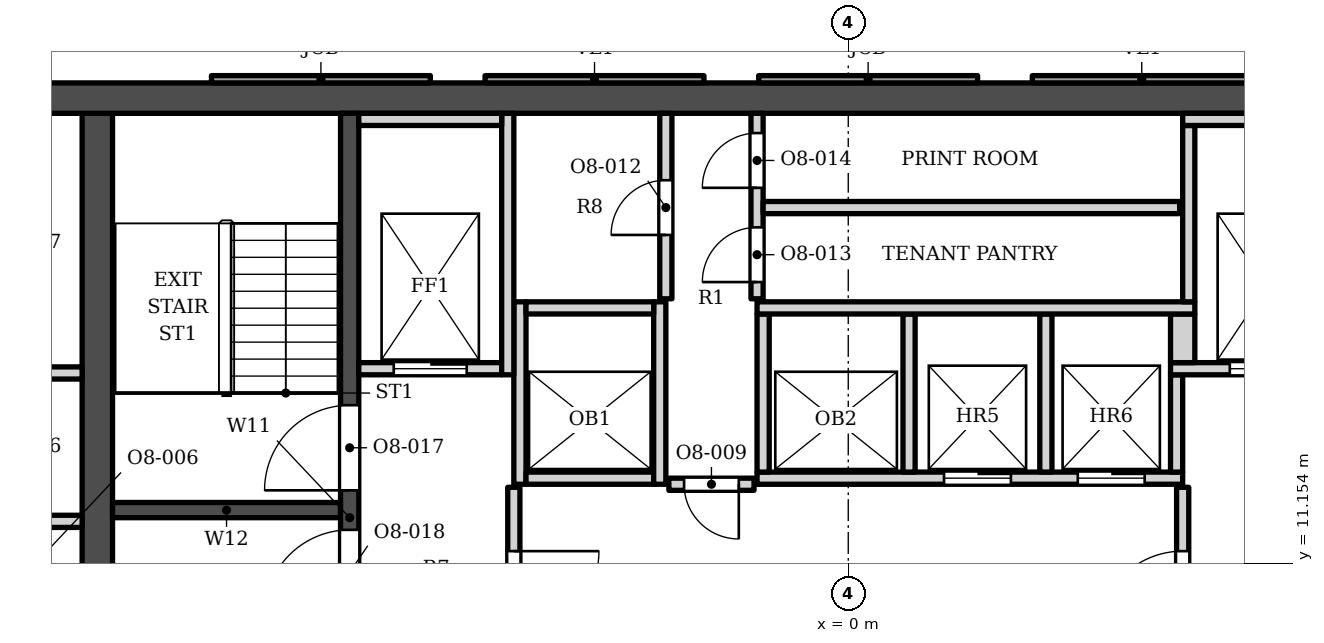
"""IFC4 building model, lengths in metres.
Left out: names, types, materials, properties, quantities, classifications, styles, units other than length and angle.
Written with IfcOpenShell. Run it as: python <this file> out.ifc"""

import sys

from ifc_helpers import new_model, si_unit, direction, frame, frame_2d, origin, place, context, subcontext, project, spatial, polyline, rectangle, outline, extrude, element, fill, save


model = new_model("IFC4")
c1 = context("Model", 3, precision=1e-05, world=origin(), true_north=direction((0.0, 1.0)))
c2 = subcontext(c1, "Body", "Model", "MODEL_VIEW")
j1 = project(units=[si_unit("LENGTHUNIT", "METRE"), si_unit("PLANEANGLEUNIT", "RADIAN")], contexts=[c1])
p1 = place(None, origin())
s1 = spatial("IfcSite", under=j1, at=p1, CompositionType="ELEMENT")
p2 = place(p1, origin())
s2 = spatial("IfcBuilding", under=s1, at=p2, CompositionType="ELEMENT")
p3 = place(p2, frame((0.0, 0.0, 231.5)))
s3 = spatial("IfcBuildingStorey", under=s2, at=p3, CompositionType="ELEMENT", Elevation=231.5)
p4 = place(p3, frame((-13.9, 18.802, 0.0), z_axis=(0.0, 0.0, 1.0), x_axis=(1.0, 0.0, 0.0)))
e1 = element("IfcWall", 1, at=p4, inside=s3, PredefinedType="SHEAR", context=c2, shape_type="SweptSolid", body=[
    extrude(rectangle(XDim=27.8, YDim=0.5, at=frame_2d((13.9, 0.0))), origin(), (0.0, 0.0, 1.0), 3.9),
])
p5 = place(p3, frame((-12.35, 5.253, 0.0), z_axis=(0.0, 0.0, 1.0), x_axis=(0.0, 1.0, 0.0)))
e2 = element("IfcWall", 2, at=p5, inside=s3, PredefinedType="SHEAR", context=c2, shape_type="SweptSolid", body=[
    extrude(rectangle(XDim=13.3, YDim=0.5, at=frame_2d((6.65, 0.0))), origin(), (0.0, 0.0, 1.0), 3.9),
])
p6 = place(p3, frame((-8.2, 5.253, 0.0), z_axis=(0.0, 0.0, 1.0), x_axis=(0.0, 1.0, 0.0)))
e3 = element("IfcWall", 3, at=p6, inside=s3, PredefinedType="SHEAR", context=c2, shape_type="SweptSolid", body=[
    extrude(rectangle(XDim=13.3, YDim=0.3, at=frame_2d((6.65, 0.0))), origin(), (0.0, 0.0, 1.0), 3.9),
])
p7 = place(p6, frame((7.1, 0.0, 0.0)))
e4 = element("IfcOpeningElement", 4, at=p7, cuts=e3, PredefinedType="OPENING", context=c2, shape_type="SweptSolid", body=[
    extrude(rectangle(XDim=1.4, YDim=2.1, at=frame_2d((0.7, 1.05))), frame((0.0, 0.16, 0.0), z_axis=(0.0, -1.0, 0.0), x_axis=(1.0, 0.0, 0.0)), (0.0, 0.0, 1.0), 0.32),
])
p8 = place(p6, frame((5.05, 0.0, 0.0)))
e5 = element("IfcOpeningElement", 5, at=p8, cuts=e3, PredefinedType="OPENING", context=c2, shape_type="SweptSolid", body=[
    extrude(rectangle(XDim=1.4, YDim=2.1, at=frame_2d((0.7, 1.05))), frame((0.0, 0.16, 0.0), z_axis=(0.0, -1.0, 0.0), x_axis=(1.0, 0.0, 0.0)), (0.0, 0.0, 1.0), 0.32),
])
p9 = place(p3, frame((-12.1, 12.028, 0.0), z_axis=(0.0, 0.0, 1.0), x_axis=(1.0, 0.0, 0.0)))
e6 = element("IfcWall", 6, at=p9, inside=s3, PredefinedType="SHEAR", context=c2, shape_type="SweptSolid", body=[
    extrude(rectangle(XDim=3.75, YDim=0.25, at=frame_2d((1.875, 0.0))), origin(), (0.0, 0.0, 1.0), 3.9),
])
p10 = place(p3, origin())
e7 = element("IfcWall", 7, at=p10, inside=s3, PredefinedType="ELEMENTEDWALL", context=c2, shape_type="SweptSolid", body=[
    extrude(outline(polyline([(3.027, 19.173), (3.027, 19.052), (6.627, 19.052), (6.627, 19.173), (3.027, 19.173)])), origin(), (0.0, 0.0, 1.0), 3.0),
])
p11 = place(p3, origin())
e8 = element("IfcWall", 8, at=p11, inside=s3, PredefinedType="SOLIDWALL", context=c2, shape_type="SweptSolid", body=[
    extrude(outline(polyline([(-1.473, 19.173), (-1.473, 19.052), (2.127, 19.052), (2.127, 19.173), (-1.473, 19.173)])), origin(), (0.0, 0.0, 1.0), 3.0),
])
p12 = place(p3, origin())
e9 = element("IfcWall", 9, at=p12, inside=s3, PredefinedType="ELEMENTEDWALL", context=c2, shape_type="SweptSolid", body=[
    extrude(outline(polyline([(-5.973, 19.173), (-5.973, 19.052), (-2.373, 19.052), (-2.373, 19.173), (-5.973, 19.173)])), origin(), (0.0, 0.0, 1.0), 3.0),
])
p13 = place(p3, origin())
e10 = element("IfcWall", 10, at=p13, inside=s3, PredefinedType="SOLIDWALL", context=c2, shape_type="SweptSolid", body=[
    extrude(outline(polyline([(-10.473, 19.173), (-10.473, 19.052), (-6.873, 19.052), (-6.873, 19.173), (-10.473, 19.173)])), origin(), (0.0, 0.0, 1.0), 3.0),
])
p14 = place(p3, frame((-5.5, 9.103, 0.0), z_axis=(0.0, 0.0, 1.0), x_axis=(0.0, 1.0, 0.0)))
e11 = element("IfcWall", 11, at=p14, inside=s3, PredefinedType="SOLIDWALL", context=c2, shape_type="SweptSolid", body=[
    extrude(rectangle(XDim=3.3, YDim=0.2, at=frame_2d((1.65, 0.0))), origin(), (0.0, 0.0, 1.0), 3.73),
])
p15 = place(p14, frame((0.85, 0.0, 0.0)))
e12 = element("IfcOpeningElement", 12, at=p15, cuts=e11, PredefinedType="OPENING", context=c2, shape_type="SweptSolid", body=[
    extrude(rectangle(XDim=1.4, YDim=2.1, at=frame_2d((0.7, 1.05))), frame((0.0, 0.11, 0.0), z_axis=(0.0, -1.0, 0.0), x_axis=(1.0, 0.0, 0.0)), (0.0, 0.0, 1.0), 0.22),
])
p16 = place(p3, frame((5.5, 9.103, 0.0), z_axis=(0.0, 0.0, 1.0), x_axis=(0.0, 1.0, 0.0)))
e13 = element("IfcWall", 13, at=p16, inside=s3, PredefinedType="SOLIDWALL", context=c2, shape_type="SweptSolid", body=[
    extrude(rectangle(XDim=3.3, YDim=0.2, at=frame_2d((1.65, 0.0))), origin(), (0.0, 0.0, 1.0), 3.73),
])
p17 = place(p16, frame((0.85, 0.0, 0.0)))
e14 = element("IfcOpeningElement", 14, at=p17, cuts=e13, PredefinedType="OPENING", context=c2, shape_type="SweptSolid", body=[
    extrude(rectangle(XDim=1.4, YDim=2.1, at=frame_2d((0.7, 1.05))), frame((0.0, 0.11, 0.0), z_axis=(0.0, -1.0, 0.0), x_axis=(1.0, 0.0, 0.0)), (0.0, 0.0, 1.0), 0.22),
])
p18 = place(p3, frame((-13.9, 11.843, 0.0), z_axis=(0.0, 0.0, 1.0), x_axis=(1.0, 0.0, 0.0)))
e15 = element("IfcWall", 15, at=p18, inside=s3, PredefinedType="SOLIDWALL", context=c2, shape_type="SweptSolid", body=[
    extrude(rectangle(XDim=1.3, YDim=0.2, at=frame_2d((0.65, 0.0))), origin(), (0.0, 0.0, 1.0), 3.73),
])
p19 = place(p3, frame((-2.95, 12.453, 0.0), z_axis=(0.0, 0.0, 1.0), x_axis=(1.0, 0.0, 0.0)))
e16 = element("IfcWall", 16, at=p19, inside=s3, PredefinedType="SOLIDWALL", context=c2, shape_type="SweptSolid", body=[
    extrude(rectangle(XDim=1.4, YDim=0.2, at=frame_2d((0.7, 0.0))), origin(), (0.0, 0.0, 1.0), 3.73),
])
p20 = place(p19, frame((0.25, 0.0, 0.0)))
e17 = element("IfcOpeningElement", 17, at=p20, cuts=e16, PredefinedType="OPENING", context=c2, shape_type="SweptSolid", body=[
    extrude(rectangle(XDim=0.9, YDim=2.1, at=frame_2d((0.45, 1.05))), frame((0.0, 0.11, 0.0), z_axis=(0.0, -1.0, 0.0), x_axis=(1.0, 0.0, 0.0)), (0.0, 0.0, 1.0), 0.22),
])
p21 = place(p3, frame((-5.4, 12.453, 0.0), z_axis=(0.0, 0.0, 1.0), x_axis=(0.0, 1.0, 0.0)))
e18 = element("IfcWall", 18, at=p21, inside=s3, PredefinedType="SOLIDWALL", context=c2, shape_type="SweptSolid", body=[
    extrude(rectangle(XDim=3.0, YDim=0.2, at=frame_2d((1.5, 0.0))), origin(), (0.0, 0.0, 1.0), 3.73),
])
p22 = place(p3, frame((-5.3, 12.552, 0.0), z_axis=(0.0, 0.0, 1.0), x_axis=(1.0, 0.0, 0.0)))
e19 = element("IfcWall", 19, at=p22, inside=s3, PredefinedType="SOLIDWALL", context=c2, shape_type="SweptSolid", body=[
    extrude(rectangle(XDim=2.1, YDim=0.2, at=frame_2d((1.05, 0.0))), origin(), (0.0, 0.0, 1.0), 3.73),
])
p23 = place(p3, frame((-3.1, 12.453, 0.0), z_axis=(0.0, 0.0, 1.0), x_axis=(0.0, 1.0, 0.0)))
e20 = element("IfcWall", 20, at=p23, inside=s3, PredefinedType="SOLIDWALL", context=c2, shape_type="SweptSolid", body=[
    extrude(rectangle(XDim=3.0, YDim=0.2, at=frame_2d((1.5, 0.0))), origin(), (0.0, 0.0, 1.0), 3.73),
])
p24 = place(p3, frame((-1.5, 12.552, 0.0), z_axis=(0.0, 0.0, 1.0), x_axis=(1.0, 0.0, 0.0)))
e21 = element("IfcWall", 21, at=p24, inside=s3, PredefinedType="SOLIDWALL", context=c2, shape_type="SweptSolid", body=[
    extrude(rectangle(XDim=7.0, YDim=0.2, at=frame_2d((3.5, 0.0))), origin(), (0.0, 0.0, 1.0), 3.73),
])
p25 = place(p24, frame((3.075, 0.0, 0.0)))
e22 = element("IfcOpeningElement", 22, at=p25, cuts=e21, PredefinedType="OPENING", context=c2, shape_type="SweptSolid", body=[
    extrude(rectangle(XDim=1.1, YDim=2.1, at=frame_2d((0.55, 1.05))), frame((0.0, 0.11, 0.0), z_axis=(0.0, -1.0, 0.0), x_axis=(1.0, 0.0, 0.0)), (0.0, 0.0, 1.0), 0.22),
])
p26 = place(p24, frame((5.275, 0.0, 0.0)))
e23 = element("IfcOpeningElement", 23, at=p26, cuts=e21, PredefinedType="OPENING", context=c2, shape_type="SweptSolid", body=[
    extrude(rectangle(XDim=1.1, YDim=2.1, at=frame_2d((0.55, 1.05))), frame((0.0, 0.11, 0.0), z_axis=(0.0, -1.0, 0.0), x_axis=(1.0, 0.0, 0.0)), (0.0, 0.0, 1.0), 0.22),
])
for number, where, z_axis, x_axis in (
    (24, (-1.4, 12.653, 0.0), (0.0, 0.0, 1.0), (0.0, 1.0, 0.0)),
    (25, (1.0, 12.653, 0.0), (0.0, 0.0, 1.0), (0.0, 1.0, 0.0)),
    (26, (3.25, 12.653, 0.0), (0.0, 0.0, 1.0), (0.0, 1.0, 0.0)),
):
    element("IfcWall", number, at=place(p3, frame(where, z_axis=z_axis, x_axis=x_axis)), inside=s3, PredefinedType="SOLIDWALL", context=c2, shape_type="SweptSolid", body=[
        extrude(rectangle(XDim=2.6, YDim=0.2, at=frame_2d((1.3, 0.0))), origin(), (0.0, 0.0, 1.0), 3.73),
    ])
p27 = place(p3, frame((5.4, 12.653, 0.0), z_axis=(0.0, 0.0, 1.0), x_axis=(0.0, 1.0, 0.0)))
e27 = element("IfcWall", 27, at=p27, inside=s3, PredefinedType="SOLIDWALL", context=c2, shape_type="SweptSolid", body=[
    extrude(rectangle(XDim=1.6, YDim=0.2, at=frame_2d((0.8, 0.0))), origin(), (0.0, 0.0, 1.0), 3.73),
])
p28 = place(p3, frame((-13.9, 14.283, 0.0), z_axis=(0.0, 0.0, 1.0), x_axis=(1.0, 0.0, 0.0)))
e28 = element("IfcWall", 28, at=p28, inside=s3, PredefinedType="SOLIDWALL", context=c2, shape_type="SweptSolid", body=[
    extrude(rectangle(XDim=1.3, YDim=0.2, at=frame_2d((0.65, 0.0))), origin(), (0.0, 0.0, 1.0), 3.73),
])
p29 = place(p3, frame((-8.05, 14.353, 0.0), z_axis=(0.0, 0.0, 1.0), x_axis=(1.0, 0.0, 0.0)))
e29 = element("IfcWall", 29, at=p29, inside=s3, PredefinedType="SOLIDWALL", context=c2, shape_type="SweptSolid", body=[
    extrude(rectangle(XDim=2.35, YDim=0.2, at=frame_2d((1.175, 0.0))), origin(), (0.0, 0.0, 1.0), 3.73),
])
p30 = place(p29, frame((0.575, 0.0, 0.0)))
e30 = element("IfcOpeningElement", 30, at=p30, cuts=e29, PredefinedType="OPENING", context=c2, shape_type="SweptSolid", body=[
    extrude(rectangle(XDim=1.2, YDim=2.1, at=frame_2d((0.6, 1.05))), frame((0.0, 0.11, 0.0), z_axis=(0.0, -1.0, 0.0), x_axis=(1.0, 0.0, 0.0)), (0.0, 0.0, 1.0), 0.22),
])
p31 = place(p3, frame((-5.6, 14.253, 0.0), z_axis=(0.0, 0.0, 1.0), x_axis=(0.0, 1.0, 0.0)))
e31 = element("IfcWall", 31, at=p31, inside=s3, PredefinedType="SOLIDWALL", context=c2, shape_type="SweptSolid", body=[
    extrude(rectangle(XDim=4.3, YDim=0.2, at=frame_2d((2.15, 0.0))), origin(), (0.0, 0.0, 1.0), 3.73),
])
p32 = place(p3, frame((5.3, 14.353, 0.0), z_axis=(0.0, 0.0, 1.0), x_axis=(1.0, 0.0, 0.0)))
e32 = element("IfcWall", 32, at=p32, inside=s3, PredefinedType="SOLIDWALL", context=c2, shape_type="SweptSolid", body=[
    extrude(rectangle(XDim=2.75, YDim=0.2, at=frame_2d((1.375, 0.0))), origin(), (0.0, 0.0, 1.0), 3.73),
])
p33 = place(p32, frame((0.975, 0.0, 0.0)))
e33 = element("IfcOpeningElement", 33, at=p33, cuts=e32, PredefinedType="OPENING", context=c2, shape_type="SweptSolid", body=[
    extrude(rectangle(XDim=1.2, YDim=2.1, at=frame_2d((0.6, 1.05))), frame((0.0, 0.11, 0.0), z_axis=(0.0, -1.0, 0.0), x_axis=(1.0, 0.0, 0.0)), (0.0, 0.0, 1.0), 0.22),
])
p34 = place(p3, frame((5.5, 14.453, 0.0), z_axis=(0.0, 0.0, 1.0), x_axis=(0.0, 1.0, 0.0)))
e34 = element("IfcWall", 34, at=p34, inside=s3, PredefinedType="SOLIDWALL", context=c2, shape_type="SweptSolid", body=[
    extrude(rectangle(XDim=0.8, YDim=0.4, at=frame_2d((0.4, 0.0))), origin(), (0.0, 0.0, 1.0), 3.73),
])
p35 = place(p3, frame((-5.3, 15.353, 0.0), z_axis=(0.0, 0.0, 1.0), x_axis=(1.0, 0.0, 0.0)))
e35 = element("IfcWall", 35, at=p35, inside=s3, PredefinedType="SOLIDWALL", context=c2, shape_type="SweptSolid", body=[
    extrude(rectangle(XDim=2.1, YDim=0.2, at=frame_2d((1.05, 0.0))), origin(), (0.0, 0.0, 1.0), 3.73),
])
p36 = place(p3, frame((-1.5, 15.353, 0.0), z_axis=(0.0, 0.0, 1.0), x_axis=(1.0, 0.0, 0.0)))
e36 = element("IfcWall", 36, at=p36, inside=s3, PredefinedType="SOLIDWALL", context=c2, shape_type="SweptSolid", body=[
    extrude(rectangle(XDim=7.2, YDim=0.2, at=frame_2d((3.6, 0.0))), origin(), (0.0, 0.0, 1.0), 3.73),
])
p37 = place(p3, frame((5.6, 15.453, 0.0), z_axis=(0.0, 0.0, 1.0), x_axis=(0.0, 1.0, 0.0)))
e37 = element("IfcWall", 37, at=p37, inside=s3, PredefinedType="SOLIDWALL", context=c2, shape_type="SweptSolid", body=[
    extrude(rectangle(XDim=2.9, YDim=0.2, at=frame_2d((1.45, 0.0))), origin(), (0.0, 0.0, 1.0), 3.73),
])
p38 = place(p3, frame((-3.0, 15.503, 0.0), z_axis=(0.0, 0.0, 1.0), x_axis=(0.0, 1.0, 0.0)))
e38 = element("IfcWall", 38, at=p38, inside=s3, PredefinedType="SOLIDWALL", context=c2, shape_type="SweptSolid", body=[
    extrude(rectangle(XDim=3.05, YDim=0.2, at=frame_2d((1.525, 0.0))), origin(), (0.0, 0.0, 1.0), 3.73),
])
p39 = place(p38, frame((1.05, 0.0, 0.0)))
e39 = element("IfcOpeningElement", 39, at=p39, cuts=e38, PredefinedType="OPENING", context=c2, shape_type="SweptSolid", body=[
    extrude(rectangle(XDim=0.9, YDim=2.1, at=frame_2d((0.45, 1.05))), frame((0.0, 0.11, 0.0), z_axis=(0.0, -1.0, 0.0), x_axis=(1.0, 0.0, 0.0)), (0.0, 0.0, 1.0), 0.22),
])
p40 = place(p3, frame((-1.5, 15.503, 0.0), z_axis=(0.0, 0.0, 1.0), x_axis=(0.0, 1.0, 0.0)))
e40 = element("IfcWall", 40, at=p40, inside=s3, PredefinedType="SOLIDWALL", context=c2, shape_type="SweptSolid", body=[
    extrude(rectangle(XDim=3.05, YDim=0.2, at=frame_2d((1.525, 0.0))), origin(), (0.0, 0.0, 1.0), 3.73),
])
p41 = place(p40, frame((0.275, 0.0, 0.0)))
e41 = element("IfcOpeningElement", 41, at=p41, cuts=e40, PredefinedType="OPENING", context=c2, shape_type="SweptSolid", body=[
    extrude(rectangle(XDim=0.9, YDim=2.1, at=frame_2d((0.45, 1.05))), frame((0.0, 0.11, 0.0), z_axis=(0.0, -1.0, 0.0), x_axis=(1.0, 0.0, 0.0)), (0.0, 0.0, 1.0), 0.22),
])
p42 = place(p40, frame((1.825, 0.0, 0.0)))
e42 = element("IfcOpeningElement", 42, at=p42, cuts=e40, PredefinedType="OPENING", context=c2, shape_type="SweptSolid", body=[
    extrude(rectangle(XDim=0.9, YDim=2.1, at=frame_2d((0.45, 1.05))), frame((0.0, 0.11, 0.0), z_axis=(0.0, -1.0, 0.0), x_axis=(1.0, 0.0, 0.0)), (0.0, 0.0, 1.0), 0.22),
])
p43 = place(p3, frame((-1.4, 17.003, 0.0), z_axis=(0.0, 0.0, 1.0), x_axis=(1.0, 0.0, 0.0)))
e43 = element("IfcWall", 43, at=p43, inside=s3, PredefinedType="SOLIDWALL", context=c2, shape_type="SweptSolid", body=[
    extrude(rectangle(XDim=6.85, YDim=0.2, at=frame_2d((3.425, 0.0))), origin(), (0.0, 0.0, 1.0), 3.73),
])
p44 = place(p3, frame((-8.05, 18.453, 0.0), z_axis=(0.0, 0.0, 1.0), x_axis=(1.0, 0.0, 0.0)))
e44 = element("IfcWall", 44, at=p44, inside=s3, PredefinedType="SOLIDWALL", context=c2, shape_type="SweptSolid", body=[
    extrude(rectangle(XDim=2.35, YDim=0.2, at=frame_2d((1.175, 0.0))), origin(), (0.0, 0.0, 1.0), 3.73),
])
p45 = place(p3, frame((5.5, 18.453, 0.0), z_axis=(0.0, 0.0, 1.0), x_axis=(1.0, 0.0, 0.0)))
e45 = element("IfcWall", 45, at=p45, inside=s3, PredefinedType="SOLIDWALL", context=c2, shape_type="SweptSolid", body=[
    extrude(rectangle(XDim=2.55, YDim=0.2, at=frame_2d((1.275, 0.0))), origin(), (0.0, 0.0, 1.0), 3.73),
])
p46 = place(p25, origin())
e46 = element("IfcDoor", 46, at=p46, inside=s3, OperationType="DOUBLE_DOOR_SLIDING", PredefinedType="DOOR", context=c2, shape_type="SweptSolid", body=[
    extrude(rectangle(XDim=1.1, YDim=2.1, at=frame_2d((0.55, 1.05))), frame((0.0, 0.025, 0.0), z_axis=(0.0, -1.0, 0.0), x_axis=(1.0, 0.0, 0.0)), (0.0, 0.0, 1.0), 0.05),
])
fill(e22, e46)
p47 = place(p26, origin())
e47 = element("IfcDoor", 47, at=p47, inside=s3, OperationType="DOUBLE_DOOR_SLIDING", PredefinedType="DOOR", context=c2, shape_type="SweptSolid", body=[
    extrude(rectangle(XDim=1.1, YDim=2.1, at=frame_2d((0.55, 1.05))), frame((0.0, 0.025, 0.0), z_axis=(0.0, -1.0, 0.0), x_axis=(1.0, 0.0, 0.0)), (0.0, 0.0, 1.0), 0.05),
])
fill(e23, e47)
p48 = place(p30, origin())
e48 = element("IfcDoor", 48, at=p48, inside=s3, OperationType="DOUBLE_DOOR_SLIDING", PredefinedType="DOOR", context=c2, shape_type="SweptSolid", body=[
    extrude(rectangle(XDim=1.2, YDim=2.1, at=frame_2d((0.6, 1.05))), frame((0.0, 0.025, 0.0), z_axis=(0.0, -1.0, 0.0), x_axis=(1.0, 0.0, 0.0)), (0.0, 0.0, 1.0), 0.05),
])
fill(e30, e48)
p49 = place(p33, origin())
e49 = element("IfcDoor", 49, at=p49, inside=s3, OperationType="DOUBLE_DOOR_SLIDING", PredefinedType="DOOR", context=c2, shape_type="SweptSolid", body=[
    extrude(rectangle(XDim=1.2, YDim=2.1, at=frame_2d((0.6, 1.05))), frame((0.0, 0.025, 0.0), z_axis=(0.0, -1.0, 0.0), x_axis=(1.0, 0.0, 0.0)), (0.0, 0.0, 1.0), 0.05),
])
fill(e33, e49)
p50 = place(p7, origin())
e50 = element("IfcDoor", 50, at=p50, inside=s3, OperationType="SINGLE_SWING_LEFT", PredefinedType="DOOR", context=c2, shape_type="SweptSolid", body=[
    extrude(rectangle(XDim=1.4, YDim=2.1, at=frame_2d((0.7, 1.05))), frame((0.0, 0.025, 0.0), z_axis=(0.0, -1.0, 0.0), x_axis=(1.0, 0.0, 0.0)), (0.0, 0.0, 1.0), 0.05),
])
fill(e4, e50)
p51 = place(p8, origin())
e51 = element("IfcDoor", 51, at=p51, inside=s3, OperationType="SINGLE_SWING_LEFT", PredefinedType="DOOR", context=c2, shape_type="SweptSolid", body=[
    extrude(rectangle(XDim=1.4, YDim=2.1, at=frame_2d((0.7, 1.05))), frame((0.0, 0.025, 0.0), z_axis=(0.0, -1.0, 0.0), x_axis=(1.0, 0.0, 0.0)), (0.0, 0.0, 1.0), 0.05),
])
fill(e5, e51)
p52 = place(p20, origin())
e52 = element("IfcDoor", 52, at=p52, inside=s3, OperationType="SINGLE_SWING_RIGHT", PredefinedType="DOOR", context=c2, shape_type="SweptSolid", body=[
    extrude(rectangle(XDim=0.9, YDim=2.1, at=frame_2d((0.45, 1.05))), frame((0.0, 0.025, 0.0), z_axis=(0.0, -1.0, 0.0), x_axis=(1.0, 0.0, 0.0)), (0.0, 0.0, 1.0), 0.05),
])
fill(e17, e52)
p53 = place(p15, origin())
e53 = element("IfcDoor", 53, at=p53, inside=s3, OperationType="SINGLE_SWING_RIGHT", PredefinedType="DOOR", context=c2, shape_type="SweptSolid", body=[
    extrude(rectangle(XDim=1.4, YDim=2.1, at=frame_2d((0.7, 1.05))), frame((0.0, 0.025, 0.0), z_axis=(0.0, -1.0, 0.0), x_axis=(1.0, 0.0, 0.0)), (0.0, 0.0, 1.0), 0.05),
])
fill(e12, e53)
p54 = place(p17, origin())
e54 = element("IfcDoor", 54, at=p54, inside=s3, OperationType="SINGLE_SWING_LEFT", PredefinedType="DOOR", context=c2, shape_type="SweptSolid", body=[
    extrude(rectangle(XDim=1.4, YDim=2.1, at=frame_2d((0.7, 1.05))), frame((0.0, 0.025, 0.0), z_axis=(0.0, -1.0, 0.0), x_axis=(1.0, 0.0, 0.0)), (0.0, 0.0, 1.0), 0.05),
])
fill(e14, e54)
p55 = place(p39, origin())
e55 = element("IfcDoor", 55, at=p55, inside=s3, OperationType="SINGLE_SWING_LEFT", PredefinedType="DOOR", context=c2, shape_type="SweptSolid", body=[
    extrude(rectangle(XDim=0.9, YDim=2.1, at=frame_2d((0.45, 1.05))), frame((0.0, 0.025, 0.0), z_axis=(0.0, -1.0, 0.0), x_axis=(1.0, 0.0, 0.0)), (0.0, 0.0, 1.0), 0.05),
])
fill(e39, e55)
p56 = place(p41, origin())
e56 = element("IfcDoor", 56, at=p56, inside=s3, OperationType="SINGLE_SWING_LEFT", PredefinedType="DOOR", context=c2, shape_type="SweptSolid", body=[
    extrude(rectangle(XDim=0.9, YDim=2.1, at=frame_2d((0.45, 1.05))), frame((0.0, 0.025, 0.0), z_axis=(0.0, -1.0, 0.0), x_axis=(1.0, 0.0, 0.0)), (0.0, 0.0, 1.0), 0.05),
])
fill(e41, e56)
p57 = place(p42, origin())
e57 = element("IfcDoor", 57, at=p57, inside=s3, OperationType="SINGLE_SWING_LEFT", PredefinedType="DOOR", context=c2, shape_type="SweptSolid", body=[
    extrude(rectangle(XDim=0.9, YDim=2.1, at=frame_2d((0.45, 1.05))), frame((0.0, 0.025, 0.0), z_axis=(0.0, -1.0, 0.0), x_axis=(1.0, 0.0, 0.0)), (0.0, 0.0, 1.0), 0.05),
])
fill(e42, e57)
save(model, sys.argv[1])
